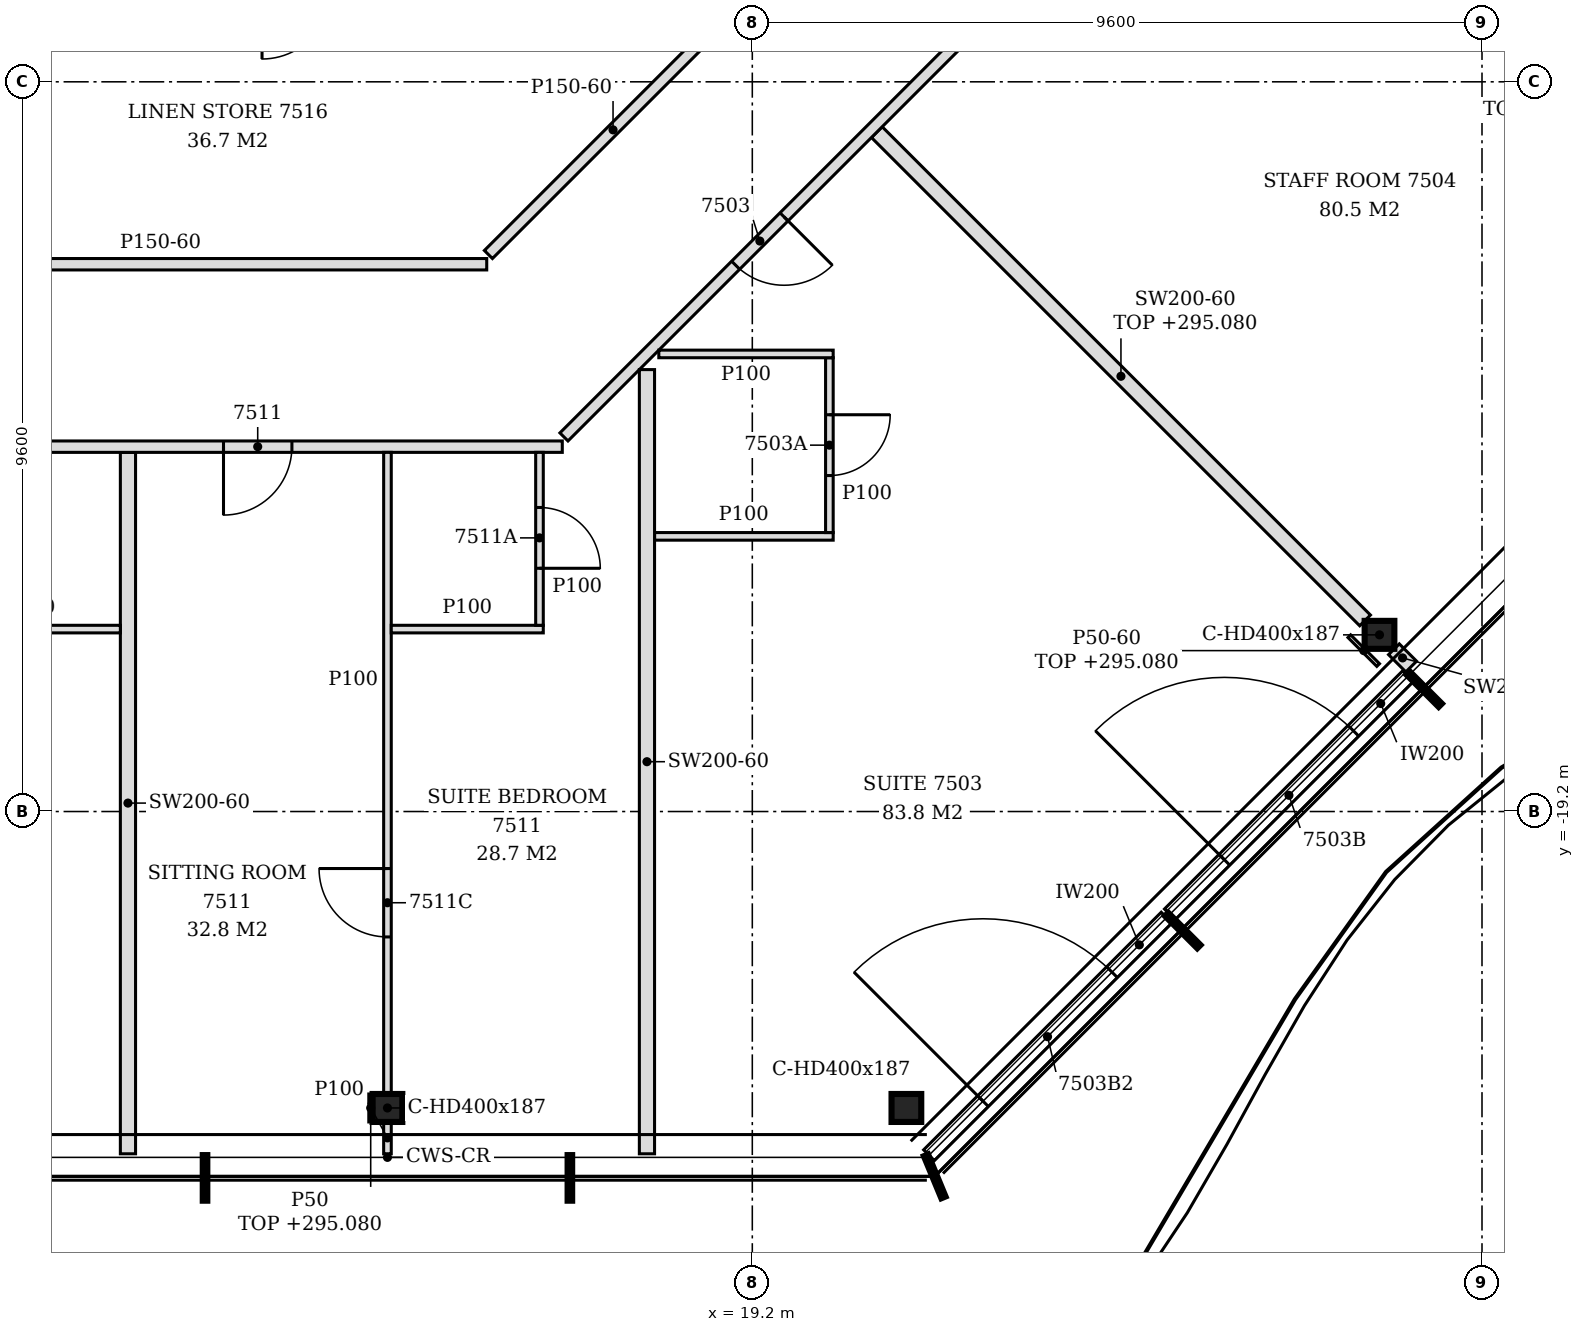
"""IFC4 building model, lengths in metres.
Left out: names, types, materials, properties, quantities, classifications, styles, units other than length and angle.
Written with IfcOpenShell. Run it as: python <this file> out.ifc"""

import sys

from ifc_helpers import new_model, si_unit, direction, frame, frame_2d, origin, origin_2d, place, context, subcontext, project, spatial, polyline, rectangle, i_section, outline, extrude, element, fill, save


model = new_model("IFC4")
c1 = context("Model", 3, precision=1e-05, world=origin(), true_north=direction((0.0, 1.0)))
c2 = subcontext(c1, "Body", "Model", "MODEL_VIEW")
j1 = project(units=[si_unit("LENGTHUNIT", "METRE"), si_unit("PLANEANGLEUNIT", "RADIAN")], contexts=[c1])
p1 = place(None, origin())
s1 = spatial("IfcSite", under=j1, at=p1, CompositionType="ELEMENT")
p2 = place(p1, origin())
s2 = spatial("IfcBuilding", under=s1, at=p2, CompositionType="ELEMENT")
p3 = place(p2, frame((0.0, 0.0, 292.2)))
s3 = spatial("IfcBuildingStorey", under=s2, at=p3, CompositionType="ELEMENT", Elevation=292.2)
for number, where, z_axis, x_axis in (
    (1, (14.4, -23.1, -0.15), (0.0, 0.0, 1.0), (1.0, 0.0, 0.0)),
    (2, (21.227, -23.1, -0.15), (0.0, 0.0, 1.0), (1.0, 0.0, 0.0)),
    (3, (27.451, -16.876, -0.15), (0.0, 0.0, 1.0), (1.0, 0.0, 0.0)),
):
    element("IfcColumn", number, at=place(p3, frame(where, z_axis=z_axis, x_axis=x_axis)), inside=s3, PredefinedType="COLUMN", context=c2, shape_type="SweptSolid", body=[
        extrude(i_section(OverallWidth=0.391, OverallDepth=0.368, WebThickness=0.015, FlangeThickness=0.024, FilletRadius=0.015, at=origin_2d()), origin(), (0.0, 0.0, 1.0), 3.55),
    ])
p4 = place(p3, frame((21.525, -23.722, 0.0), z_axis=(0.0, 0.0, 1.0), x_axis=(0.707134392299, 0.707079168996, 0.0)))
e4 = element("IfcWall", 4, at=p4, inside=s3, PredefinedType="NOTDEFINED", context=c2, shape_type="SweptSolid", body=[
    extrude(rectangle(XDim=4.421, YDim=0.2, at=frame_2d((2.21, 0.0))), origin(), (0.0, 0.0, 1.0), 3.4),
])
p5 = place(p4, frame((1.005, 0.0, 0.0)))
e5 = element("IfcOpeningElement", 5, at=p5, cuts=e4, PredefinedType="OPENING", context=c2, shape_type="SweptSolid", body=[
    extrude(rectangle(XDim=2.4, YDim=2.4, at=frame_2d((1.2, 1.2))), frame((0.0, 0.11, 0.0), z_axis=(0.0, -1.0, 0.0), x_axis=(1.0, 0.0, 0.0)), (0.0, 0.0, 1.0), 0.22),
])
p6 = place(p3, frame((24.693, -20.553, 0.0), z_axis=(0.0, 0.0, 1.0), x_axis=(0.707079231393, 0.707134329907, 0.0)))
e6 = element("IfcWall", 6, at=p6, inside=s3, PredefinedType="NOTDEFINED", context=c2, shape_type="SweptSolid", body=[
    extrude(rectangle(XDim=4.431, YDim=0.2, at=frame_2d((2.215, 0.0))), origin(), (0.0, 0.0, 1.0), 3.4),
])
p7 = place(p6, frame((1.015, 0.0, 0.0)))
e7 = element("IfcOpeningElement", 7, at=p7, cuts=e6, PredefinedType="OPENING", context=c2, shape_type="SweptSolid", body=[
    extrude(rectangle(XDim=2.4, YDim=2.4, at=frame_2d((1.2, 1.2))), frame((0.0, 0.11, 0.0), z_axis=(0.0, -1.0, 0.0), x_axis=(1.0, 0.0, 0.0)), (0.0, 0.0, 1.0), 0.22),
])
p8 = place(p3, frame((10.986, -23.703, 0.0), z_axis=(0.0, 0.0, 1.0), x_axis=(0.0, 1.0, 0.0)))
e8 = element("IfcWall", 8, at=p8, inside=s3, PredefinedType="PARTITIONING", context=c2, shape_type="SweptSolid", body=[
    extrude(outline(polyline([(0.0, 0.0), (9.228, 0.0), (9.228, 2.83), (9.198, 2.83), (9.196, 3.4), (4.608, 3.4), (4.606, 2.83), (4.398, 2.83), (4.396, 3.4), (0.753, 3.4), (0.751, 2.88), (0.453, 2.88), (0.451, 3.4), (0.0, 3.4), (0.0, 0.0)])), frame((0.0, 0.1, 0.0), z_axis=(0.0, -1.0, 0.0), x_axis=(1.0, 0.0, 0.0)), (0.0, 0.0, 1.0), 0.2),
])
p9 = place(p3, frame((14.4, -23.703, 0.0), z_axis=(0.0, 0.0, 1.0), x_axis=(0.0, 1.0, 0.0)))
e9 = element("IfcWall", 9, at=p9, inside=s3, PredefinedType="PARTITIONING", context=c2, shape_type="SweptSolid", body=[
    extrude(rectangle(XDim=0.419, YDim=0.1, at=frame_2d((0.209, 0.0))), origin(), (0.0, 0.0, 1.0), 3.4),
])
p10 = place(p3, frame((17.814, -23.703, 0.0), z_axis=(0.0, 0.0, 1.0), x_axis=(0.0, 1.0, 0.0)))
e10 = element("IfcWall", 10, at=p10, inside=s3, PredefinedType="PARTITIONING", context=c2, shape_type="SweptSolid", body=[
    extrude(outline(polyline([(0.0, 0.0), (10.317, 0.0), (10.317, 3.4), (9.408, 3.4), (9.406, 2.83), (9.198, 2.83), (9.196, 3.4), (4.608, 3.4), (4.606, 2.83), (4.398, 2.83), (4.396, 3.4), (0.753, 3.4), (0.751, 2.88), (0.453, 2.88), (0.451, 3.4), (0.0, 3.4), (0.0, 0.0)])), frame((0.0, 0.1, 0.0), z_axis=(0.0, -1.0, 0.0), x_axis=(1.0, 0.0, 0.0)), (0.0, 0.0, 1.0), 0.2),
])
p11 = place(p3, frame((14.4, -22.916, 0.0), z_axis=(0.0, 0.0, 1.0), x_axis=(0.0, 1.0, 0.0)))
e11 = element("IfcWall", 11, at=p11, inside=s3, PredefinedType="PARTITIONING", context=c2, shape_type="SweptSolid", body=[
    extrude(outline(polyline([(0.0, 0.0), (8.441, 0.0), (8.441, 2.83), (8.411, 2.83), (8.409, 3.4), (3.821, 3.4), (3.819, 2.83), (3.611, 2.83), (3.609, 3.4), (0.0, 3.4), (0.0, 0.0)])), frame((0.0, 0.05, 0.0), z_axis=(0.0, -1.0, 0.0), x_axis=(1.0, 0.0, 0.0)), (0.0, 0.0, 1.0), 0.1),
])
p12 = place(p11, frame((2.066, 0.0, 0.0)))
e12 = element("IfcOpeningElement", 12, at=p12, cuts=e11, PredefinedType="OPENING", context=c2, shape_type="SweptSolid", body=[
    extrude(rectangle(XDim=0.9, YDim=2.1, at=frame_2d((0.45, 1.05))), frame((0.0, 0.06, 0.0), z_axis=(0.0, -1.0, 0.0), x_axis=(1.0, 0.0, 0.0)), (0.0, 0.0, 1.0), 0.12),
])
p13 = place(p3, frame((27.869, -17.293, 0.0), z_axis=(0.0, 0.0, 1.0), x_axis=(-0.707106781187, 0.707106781187, 0.0)))
e13 = element("IfcWall", 13, at=p13, inside=s3, PredefinedType="PARTITIONING", context=c2, shape_type="SweptSolid", body=[
    extrude(rectangle(XDim=0.322, YDim=0.2, at=frame_2d((0.161, 0.0))), origin(), (0.0, 0.0, 1.0), 3.4),
])
p14 = place(p3, frame((8.536, -16.8, 0.0), z_axis=(0.0, 0.0, 1.0), x_axis=(1.0, 0.0, 0.0)))
e14 = element("IfcWall", 14, at=p14, inside=s3, PredefinedType="PARTITIONING", context=c2, shape_type="SweptSolid", body=[
    extrude(rectangle(XDim=2.35, YDim=0.1, at=frame_2d((1.175, 0.0))), origin(), (0.0, 0.0, 1.0), 3.4),
])
p15 = place(p3, frame((14.45, -16.8, 0.0), z_axis=(0.0, 0.0, 1.0), x_axis=(1.0, 0.0, 0.0)))
e15 = element("IfcWall", 15, at=p15, inside=s3, PredefinedType="PARTITIONING", context=c2, shape_type="SweptSolid", body=[
    extrude(rectangle(XDim=2.0, YDim=0.1, at=frame_2d((1.0, 0.0))), origin(), (0.0, 0.0, 1.0), 3.4),
])
p16 = place(p3, frame((16.4, -16.75, 0.0), z_axis=(0.0, 0.0, 1.0), x_axis=(0.0, 1.0, 0.0)))
e16 = element("IfcWall", 16, at=p16, inside=s3, PredefinedType="PARTITIONING", context=c2, shape_type="SweptSolid", body=[
    extrude(outline(polyline([(0.0, 0.0), (2.275, 0.0), (2.275, 2.83), (2.245, 2.83), (2.243, 3.4), (0.0, 3.4), (0.0, 0.0)])), frame((0.0, 0.05, 0.0), z_axis=(0.0, -1.0, 0.0), x_axis=(1.0, 0.0, 0.0)), (0.0, 0.0, 1.0), 0.1),
])
p17 = place(p16, frame((0.75, 0.0, 0.0)))
e17 = element("IfcOpeningElement", 17, at=p17, cuts=e16, PredefinedType="OPENING", context=c2, shape_type="SweptSolid", body=[
    extrude(rectangle(XDim=0.8, YDim=2.1, at=frame_2d((0.4, 1.05))), frame((0.0, 0.06, 0.0), z_axis=(0.0, -1.0, 0.0), x_axis=(1.0, 0.0, 0.0)), (0.0, 0.0, 1.0), 0.12),
])
p18 = place(p3, frame((27.262, -16.686, 0.0), z_axis=(0.0, 0.0, 1.0), x_axis=(-0.707106781187, 0.707106781187, 0.0)))
e18 = element("IfcWall", 18, at=p18, inside=s3, PredefinedType="PARTITIONING", context=c2, shape_type="SweptSolid", body=[
    extrude(rectangle(XDim=9.085, YDim=0.2, at=frame_2d((4.542, 0.0))), origin(), (0.0, 0.0, 1.0), 2.88),
])
p19 = place(p3, frame((17.914, -15.58, 0.0), z_axis=(0.0, 0.0, 1.0), x_axis=(1.0, 0.0, 0.0)))
e19 = element("IfcWall", 19, at=p19, inside=s3, PredefinedType="PARTITIONING", context=c2, shape_type="SweptSolid", body=[
    extrude(outline(polyline([(0.0, 0.0), (2.35, 0.0), (2.35, 3.4), (1.436, 3.4), (1.434, 2.68), (1.136, 2.68), (1.134, 3.4), (0.0, 3.4), (0.0, 0.0)])), frame((0.0, 0.05, 0.0), z_axis=(0.0, -1.0, 0.0), x_axis=(1.0, 0.0, 0.0)), (0.0, 0.0, 1.0), 0.1),
])
p20 = place(p3, frame((20.214, -15.53, 0.0), z_axis=(0.0, 0.0, 1.0), x_axis=(0.0, 1.0, 0.0)))
e20 = element("IfcWall", 20, at=p20, inside=s3, PredefinedType="PARTITIONING", context=c2, shape_type="SweptSolid", body=[
    extrude(outline(polyline([(0.0, 0.0), (2.3, 0.0), (2.3, 3.4), (1.23, 3.4), (1.228, 2.88), (1.03, 2.88), (1.028, 3.4), (0.0, 3.4), (0.0, 0.0)])), frame((0.0, 0.05, 0.0), z_axis=(0.0, -1.0, 0.0), x_axis=(1.0, 0.0, 0.0)), (0.0, 0.0, 1.0), 0.1),
])
p21 = place(p20, frame((0.75, 0.0, 0.0)))
e21 = element("IfcOpeningElement", 21, at=p21, cuts=e20, PredefinedType="OPENING", context=c2, shape_type="SweptSolid", body=[
    extrude(rectangle(XDim=0.8, YDim=2.1, at=frame_2d((0.4, 1.05))), frame((0.0, 0.06, 0.0), z_axis=(0.0, -1.0, 0.0), x_axis=(1.0, 0.0, 0.0)), (0.0, 0.0, 1.0), 0.12),
])
p22 = place(p3, frame((-1.926, -14.4, 0.0), z_axis=(0.0, 0.0, 1.0), x_axis=(1.0, 0.0, 0.0)))
e22 = element("IfcWall", 22, at=p22, inside=s3, PredefinedType="PARTITIONING", context=c2, shape_type="SweptSolid", body=[
    extrude(outline(polyline([(0.0, 0.0), (18.626, 0.0), (18.626, 2.83), (9.276, 2.83), (9.274, 2.68), (8.976, 2.68), (8.974, 2.83), (1.369, 2.83), (1.367, 2.58), (0.229, 2.58), (0.227, 2.83), (0.0, 2.83), (0.0, 0.0)])), frame((0.0, 0.075, 0.0), z_axis=(0.0, -1.0, 0.0), x_axis=(1.0, 0.0, 0.0)), (0.0, 0.0, 1.0), 0.15),
])
p23 = place(p22, frame((4.569, 0.0, 0.0)))
e23 = element("IfcOpeningElement", 23, at=p23, cuts=e22, PredefinedType="OPENING", context=c2, shape_type="SweptSolid", body=[
    extrude(rectangle(XDim=0.9, YDim=2.1, at=frame_2d((0.45, 1.05))), frame((0.0, 0.085, 0.0), z_axis=(0.0, -1.0, 0.0), x_axis=(1.0, 0.0, 0.0)), (0.0, 0.0, 1.0), 0.17),
])
p24 = place(p22, frame((14.169, 0.0, 0.0)))
e24 = element("IfcOpeningElement", 24, at=p24, cuts=e22, PredefinedType="OPENING", context=c2, shape_type="SweptSolid", body=[
    extrude(rectangle(XDim=0.9, YDim=2.1, at=frame_2d((0.45, 1.05))), frame((0.0, 0.085, 0.0), z_axis=(0.0, -1.0, 0.0), x_axis=(1.0, 0.0, 0.0)), (0.0, 0.0, 1.0), 0.17),
])
p25 = place(p3, frame((16.722, -14.272, 0.0), z_axis=(0.0, 0.0, 1.0), x_axis=(0.707106781187, 0.707106781187, 0.0)))
e25 = element("IfcWall", 25, at=p25, inside=s3, PredefinedType="PARTITIONING", context=c2, shape_type="SweptSolid", body=[
    extrude(rectangle(XDim=20.058, YDim=0.15, at=frame_2d((10.029, 0.0))), origin(), (0.0, 0.0, 1.0), 2.68),
])
p26 = place(p25, frame((3.195, 0.0, 0.0)))
e26 = element("IfcOpeningElement", 26, at=p26, cuts=e25, PredefinedType="OPENING", context=c2, shape_type="SweptSolid", body=[
    extrude(rectangle(XDim=0.9, YDim=2.1, at=frame_2d((0.45, 1.05))), frame((0.0, 0.085, 0.0), z_axis=(0.0, -1.0, 0.0), x_axis=(1.0, 0.0, 0.0)), (0.0, 0.0, 1.0), 0.17),
])
p27 = place(p25, frame((9.193, 0.0, 0.0)))
e27 = element("IfcOpeningElement", 27, at=p27, cuts=e25, PredefinedType="OPENING", context=c2, shape_type="SweptSolid", body=[
    extrude(rectangle(XDim=0.9, YDim=2.1, at=frame_2d((0.45, 1.05))), frame((0.0, 0.085, 0.0), z_axis=(0.0, -1.0, 0.0), x_axis=(1.0, 0.0, 0.0)), (0.0, 0.0, 1.0), 0.17),
])
p28 = place(p25, frame((17.613, 0.0, 0.0)))
e28 = element("IfcOpeningElement", 28, at=p28, cuts=e25, PredefinedType="OPENING", context=c2, shape_type="SweptSolid", body=[
    extrude(rectangle(XDim=0.9, YDim=2.1, at=frame_2d((0.45, 1.05))), frame((0.0, 0.085, 0.0), z_axis=(0.0, -1.0, 0.0), x_axis=(1.0, 0.0, 0.0)), (0.0, 0.0, 1.0), 0.17),
])
p29 = place(p3, frame((17.97, -13.18, 0.0), z_axis=(0.0, 0.0, 1.0), x_axis=(1.0, 0.0, 0.0)))
e29 = element("IfcWall", 29, at=p29, inside=s3, PredefinedType="PARTITIONING", context=c2, shape_type="SweptSolid", body=[
    extrude(outline(polyline([(0.0, 0.0), (2.294, 0.0), (2.294, 3.4), (1.38, 3.4), (1.378, 2.68), (1.08, 2.68), (1.078, 3.4), (0.0, 3.4), (0.0, 0.0)])), frame((0.0, 0.05, 0.0), z_axis=(0.0, -1.0, 0.0), x_axis=(1.0, 0.0, 0.0)), (0.0, 0.0, 1.0), 0.1),
])
p30 = place(p3, frame((7.125, -12.0, 0.0), z_axis=(0.0, 0.0, 1.0), x_axis=(1.0, 0.0, 0.0)))
e30 = element("IfcWall", 30, at=p30, inside=s3, PredefinedType="PARTITIONING", context=c2, shape_type="SweptSolid", body=[
    extrude(outline(polyline([(0.0, 0.0), (8.581, 0.0), (8.581, 3.4), (0.225, 3.4), (0.223, 2.68), (0.0, 2.68), (0.0, 0.0)])), frame((0.0, 0.075, 0.0), z_axis=(0.0, -1.0, 0.0), x_axis=(1.0, 0.0, 0.0)), (0.0, 0.0, 1.0), 0.15),
])
p31 = place(p3, frame((15.728, -11.872, 0.0), z_axis=(0.0, 0.0, 1.0), x_axis=(0.707106781187, 0.707106781187, 0.0)))
e31 = element("IfcWall", 31, at=p31, inside=s3, PredefinedType="PARTITIONING", context=c2, shape_type="SweptSolid", body=[
    extrude(rectangle(XDim=4.638, YDim=0.15, at=frame_2d((2.319, 0.0))), origin(), (0.0, 0.0, 1.0), 3.4),
])
p32 = place(p3, frame((31.008, -9.408, 0.0), z_axis=(0.0, 0.0, 1.0), x_axis=(-0.707106781187, 0.707106781187, 0.0)))
e32 = element("IfcWall", 32, at=p32, inside=s3, PredefinedType="PARTITIONING", context=c2, shape_type="SweptSolid", body=[
    extrude(rectangle(XDim=6.587, YDim=0.2, at=frame_2d((3.293, 0.0))), origin(), (0.0, 0.0, 1.0), 2.83),
])
p33 = place(p3, frame((14.179, -23.284, 0.0), z_axis=(0.0, 0.0, 1.0), x_axis=(0.0, 1.0, 0.0)))
e33 = element("IfcWall", 33, at=p33, inside=s3, PredefinedType="PARTITIONING", context=c2, shape_type="SweptSolid", body=[
    extrude(rectangle(XDim=0.368, YDim=0.05, at=frame_2d((0.184, 0.0))), origin(), (0.0, 0.0, 1.0), 2.88),
])
p34 = place(p3, frame((27.434, -17.273, 0.0), z_axis=(0.0, 0.0, 1.0), x_axis=(-0.707106781187, 0.707106781187, 0.0)))
e34 = element("IfcWall", 34, at=p34, inside=s3, PredefinedType="PARTITIONING", context=c2, shape_type="SweptSolid", body=[
    extrude(rectangle(XDim=0.537, YDim=0.05, at=frame_2d((0.269, 0.0))), origin(), (0.0, 0.0, 1.0), 2.88),
])
p35 = place(p5, origin())
e35 = element("IfcDoor", 35, at=p35, inside=s3, OperationType="SINGLE_SWING_LEFT", PredefinedType="DOOR", context=c2, shape_type="SweptSolid", body=[
    extrude(rectangle(XDim=2.4, YDim=2.4, at=frame_2d((1.2, 1.2))), frame((0.0, 0.025, 0.0), z_axis=(0.0, -1.0, 0.0), x_axis=(1.0, 0.0, 0.0)), (0.0, 0.0, 1.0), 0.05),
])
fill(e5, e35)
p36 = place(p7, origin())
e36 = element("IfcDoor", 36, at=p36, inside=s3, OperationType="SINGLE_SWING_LEFT", PredefinedType="DOOR", context=c2, shape_type="SweptSolid", body=[
    extrude(rectangle(XDim=2.4, YDim=2.4, at=frame_2d((1.2, 1.2))), frame((0.0, 0.025, 0.0), z_axis=(0.0, -1.0, 0.0), x_axis=(1.0, 0.0, 0.0)), (0.0, 0.0, 1.0), 0.05),
])
fill(e7, e36)
p37 = place(p26, frame((0.9, 0.0, 0.0), z_axis=(0.0, 0.0, 1.0), x_axis=(-1.0, 0.0, 0.0)))
e37 = element("IfcDoor", 37, at=p37, inside=s3, OperationType="SINGLE_SWING_LEFT", PredefinedType="DOOR", context=c2, shape_type="SweptSolid", body=[
    extrude(rectangle(XDim=0.9, YDim=2.1, at=frame_2d((0.45, 1.05))), frame((0.0, 0.025, 0.0), z_axis=(0.0, -1.0, 0.0), x_axis=(1.0, 0.0, 0.0)), (0.0, 0.0, 1.0), 0.05),
])
fill(e26, e37)
p38 = place(p21, frame((0.8, 0.0, 0.0), z_axis=(0.0, 0.0, 1.0), x_axis=(-1.0, 0.0, 0.0)))
e38 = element("IfcDoor", 38, at=p38, inside=s3, OperationType="SINGLE_SWING_LEFT", PredefinedType="DOOR", context=c2, shape_type="SweptSolid", body=[
    extrude(rectangle(XDim=0.8, YDim=2.1, at=frame_2d((0.4, 1.05))), frame((0.0, 0.025, 0.0), z_axis=(0.0, -1.0, 0.0), x_axis=(1.0, 0.0, 0.0)), (0.0, 0.0, 1.0), 0.05),
])
fill(e21, e38)
p39 = place(p24, frame((0.9, 0.0, 0.0), z_axis=(0.0, 0.0, 1.0), x_axis=(-1.0, 0.0, 0.0)))
e39 = element("IfcDoor", 39, at=p39, inside=s3, OperationType="SINGLE_SWING_RIGHT", PredefinedType="DOOR", context=c2, shape_type="SweptSolid", body=[
    extrude(rectangle(XDim=0.9, YDim=2.1, at=frame_2d((0.45, 1.05))), frame((0.0, 0.025, 0.0), z_axis=(0.0, -1.0, 0.0), x_axis=(1.0, 0.0, 0.0)), (0.0, 0.0, 1.0), 0.05),
])
fill(e24, e39)
p40 = place(p12, origin())
e40 = element("IfcDoor", 40, at=p40, inside=s3, OperationType="SINGLE_SWING_RIGHT", PredefinedType="DOOR", context=c2, shape_type="SweptSolid", body=[
    extrude(rectangle(XDim=0.9, YDim=2.1, at=frame_2d((0.45, 1.05))), frame((0.0, 0.025, 0.0), z_axis=(0.0, -1.0, 0.0), x_axis=(1.0, 0.0, 0.0)), (0.0, 0.0, 1.0), 0.05),
])
fill(e12, e40)
p41 = place(p17, frame((0.8, 0.0, 0.0), z_axis=(0.0, 0.0, 1.0), x_axis=(-1.0, 0.0, 0.0)))
e41 = element("IfcDoor", 41, at=p41, inside=s3, OperationType="SINGLE_SWING_RIGHT", PredefinedType="DOOR", context=c2, shape_type="SweptSolid", body=[
    extrude(rectangle(XDim=0.8, YDim=2.1, at=frame_2d((0.4, 1.05))), frame((0.0, 0.025, 0.0), z_axis=(0.0, -1.0, 0.0), x_axis=(1.0, 0.0, 0.0)), (0.0, 0.0, 1.0), 0.05),
])
fill(e17, e41)
save(model, sys.argv[1])
